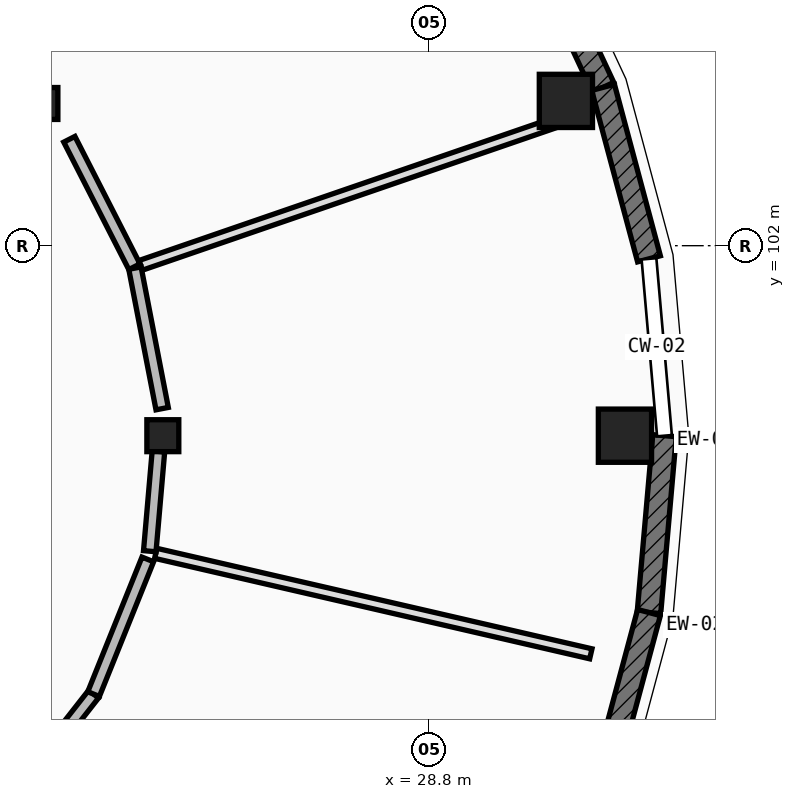
"""IFC4 building model, lengths in metres.
Left out: names, types, materials, properties, quantities, classifications, styles, units other than length and angle.
Written with IfcOpenShell. Run it as: python <this file> out.ifc"""

import sys

from ifc_helpers import new_model, si_unit, direction, frame, frame_2d, origin, origin_2d, place, context, subcontext, project, spatial, rectangle, circle, extrude, element, fill, save


model = new_model("IFC4")
c1 = context("Model", 3, precision=1e-05, world=origin(), true_north=direction((0.0, 1.0)))
c2 = subcontext(c1, "Body", "Model", "MODEL_VIEW")
j1 = project(units=[si_unit("LENGTHUNIT", "METRE"), si_unit("PLANEANGLEUNIT", "RADIAN")], contexts=[c1])
p1 = place(None, origin())
s1 = spatial("IfcSite", under=j1, at=p1, CompositionType="ELEMENT")
p2 = place(p1, origin())
s2 = spatial("IfcBuilding", under=s1, at=p2, CompositionType="ELEMENT")
p3 = place(p2, origin())
s3 = spatial("IfcBuildingStorey", under=s2, at=p3, CompositionType="ELEMENT", Elevation=0.0)
for number, where, z_axis, x_axis in (
    (1, (31.38, 99.5, 0.0), (0.0, 0.0, 1.0), (1.0, 0.0, 0.0)),
    (2, (30.603, 103.905, 0.0), (0.0, 0.0, 1.0), (1.0, 0.0, 0.0)),
):
    element("IfcColumn", number, at=place(p3, frame(where, z_axis=z_axis, x_axis=x_axis)), inside=s3, PredefinedType="COLUMN", context=c2, shape_type="SweptSolid", body=[
        extrude(circle(Radius=0.35, at=origin_2d()), origin(), (0.0, 0.0, 1.0), 4.55),
    ])
for number, where, z_axis, x_axis in (
    (3, (25.3, 99.5, 0.0), (0.0, 0.0, 1.0), (1.0, 0.0, 0.0)),
    (4, (23.709, 103.871, 0.0), (0.0, 0.0, 1.0), (1.0, 0.0, 0.0)),
):
    element("IfcColumn", number, at=place(p3, frame(where, z_axis=z_axis, x_axis=x_axis)), inside=s3, PredefinedType="COLUMN", context=c2, shape_type="SweptSolid", body=[
        extrude(rectangle(XDim=0.42, YDim=0.42, at=origin_2d()), origin(), (0.0, 0.0, 1.0), 4.55),
    ])
p4 = place(p3, frame((31.9, 99.5, 0.0), z_axis=(0.0, 0.0, 1.0), x_axis=(-0.087274565792, -0.996184295282, 0.0)))
e5 = element("IfcWall", 5, at=p4, inside=s3, PredefinedType="SOLIDWALL", context=c2, shape_type="SweptSolid", body=[
    extrude(rectangle(XDim=2.336, YDim=0.31, at=frame_2d((1.168, 0.0))), origin(), (0.0, 0.0, 1.0), 3.659),
])
p5 = place(p3, frame((31.696, 97.173, 0.0), z_axis=(0.0, 0.0, 1.0), x_axis=(-0.258612423585, -0.965981166673, 0.0)))
e6 = element("IfcWall", 6, at=p5, inside=s3, PredefinedType="SOLIDWALL", context=c2, shape_type="SweptSolid", body=[
    extrude(rectangle(XDim=2.335, YDim=0.31, at=frame_2d((1.168, 0.0))), origin(), (0.0, 0.0, 1.0), 3.659),
])
p6 = place(p3, frame((30.105, 106.2, 0.0), z_axis=(0.0, 0.0, 1.0), x_axis=(0.422587894318, -0.906321946979, 0.0)))
e7 = element("IfcWall", 7, at=p6, inside=s3, PredefinedType="SOLIDWALL", context=c2, shape_type="SweptSolid", body=[
    extrude(rectangle(XDim=2.336, YDim=0.31, at=frame_2d((1.168, 0.0))), origin(), (0.0, 0.0, 1.0), 3.659),
])
p7 = place(p3, frame((31.092, 104.083, 0.0), z_axis=(0.0, 0.0, 1.0), x_axis=(0.258612423585, -0.965981166673, 0.0)))
e8 = element("IfcWall", 8, at=p7, inside=s3, PredefinedType="SOLIDWALL", context=c2, shape_type="SweptSolid", body=[
    extrude(rectangle(XDim=2.335, YDim=0.31, at=frame_2d((1.168, 0.0))), origin(), (0.0, 0.0, 1.0), 3.659),
])
p8 = place(p3, frame((25.207, 97.952, 0.0), z_axis=(0.0, 0.0, 1.0), x_axis=(0.97434915279, -0.225041614944, 0.0)))
e9 = element("IfcWall", 9, at=p8, inside=s3, PredefinedType="PLUMBINGWALL", context=c2, shape_type="SweptSolid", body=[
    extrude(rectangle(XDim=5.875, YDim=0.135, at=frame_2d((2.937, 0.0))), origin(), (0.0, 0.0, 1.0), 3.634),
])
p9 = place(p3, frame((25.008, 101.741, 0.0), z_axis=(0.0, 0.0, 1.0), x_axis=(0.945537377012, 0.325513546068, 0.0)))
e10 = element("IfcWall", 10, at=p9, inside=s3, PredefinedType="PLUMBINGWALL", context=c2, shape_type="SweptSolid", body=[
    extrude(rectangle(XDim=5.898, YDim=0.135, at=frame_2d((2.949, 0.0))), origin(), (0.0, 0.0, 1.0), 3.634),
])
p10 = place(p3, frame((23.786, 95.33, 0.0), z_axis=(0.0, 0.0, 1.0), x_axis=(0.616563995623, 0.787304794411, 0.0)))
e11 = element("IfcWall", 11, at=p10, inside=s3, PredefinedType="PARTITIONING", context=c2, shape_type="SweptSolid", body=[
    extrude(rectangle(XDim=0.978, YDim=0.165, at=frame_2d((0.489, 0.0))), origin(), (0.0, 0.0, 1.0), 3.634),
])
p11 = place(p3, frame((24.389, 96.1, 0.0), z_axis=(0.0, 0.0, 1.0), x_axis=(0.373351165524, 0.927690092219, 0.0)))
e12 = element("IfcWall", 12, at=p11, inside=s3, PredefinedType="PARTITIONING", context=c2, shape_type="SweptSolid", body=[
    extrude(rectangle(XDim=1.91, YDim=0.165, at=frame_2d((0.955, 0.0))), origin(), (0.0, 0.0, 1.0), 3.634),
])
p12 = place(p11, frame((0.48, 0.0, 0.0)))
e13 = element("IfcOpeningElement", 13, at=p12, cuts=e12, PredefinedType="OPENING", context=c2, shape_type="SweptSolid", body=[
    extrude(rectangle(XDim=0.95, YDim=2.16, at=frame_2d((0.475, 1.08))), frame((0.0, 0.093, 0.0), z_axis=(0.0, -1.0, 0.0), x_axis=(1.0, 0.0, 0.0)), (0.0, 0.0, 1.0), 0.185),
])
p13 = place(p3, frame((25.128, 97.98, 0.0), z_axis=(0.0, 0.0, 1.0), x_axis=(0.086509710028, 0.996251007563, 0.0)))
e14 = element("IfcWall", 14, at=p13, inside=s3, PredefinedType="PARTITIONING", context=c2, shape_type="SweptSolid", body=[
    extrude(rectangle(XDim=1.318, YDim=0.165, at=frame_2d((0.659, 0.0))), origin(), (0.0, 0.0, 1.0), 3.634),
])
p14 = place(p3, frame((25.291, 99.856, 0.0), z_axis=(0.0, 0.0, 1.0), x_axis=(-0.19002996748, 0.981778290379, 0.0)))
e15 = element("IfcWall", 15, at=p14, inside=s3, PredefinedType="PARTITIONING", context=c2, shape_type="SweptSolid", body=[
    extrude(rectangle(XDim=1.884, YDim=0.165, at=frame_2d((0.942, 0.0))), origin(), (0.0, 0.0, 1.0), 3.634),
])
p15 = place(p14, frame((0.452, 0.0, 0.0)))
e16 = element("IfcOpeningElement", 16, at=p15, cuts=e15, PredefinedType="OPENING", context=c2, shape_type="SweptSolid", body=[
    extrude(rectangle(XDim=0.98, YDim=2.1, at=frame_2d((0.49, 1.05))), frame((0.0, 0.093, 0.0), z_axis=(0.0, -1.0, 0.0), x_axis=(1.0, 0.0, 0.0)), (0.0, 0.0, 1.0), 0.185),
])
p16 = place(p3, frame((24.926, 101.723, 0.0), z_axis=(0.0, 0.0, 1.0), x_axis=(-0.454615215632, 0.890687939582, 0.0)))
e17 = element("IfcWall", 17, at=p16, inside=s3, PredefinedType="PARTITIONING", context=c2, shape_type="SweptSolid", body=[
    extrude(rectangle(XDim=1.883, YDim=0.165, at=frame_2d((0.941, 0.0))), origin(), (0.0, 0.0, 1.0), 3.634),
])
p17 = place(p16, frame((0.492, 0.0, 0.0)))
e18 = element("IfcOpeningElement", 18, at=p17, cuts=e17, PredefinedType="OPENING", context=c2, shape_type="SweptSolid", body=[
    extrude(rectangle(XDim=0.9, YDim=2.1, at=frame_2d((0.45, 1.05))), frame((0.0, 0.093, 0.0), z_axis=(0.0, -1.0, 0.0), x_axis=(1.0, 0.0, 0.0)), (0.0, 0.0, 1.0), 0.185),
])
p18 = place(p12, origin())
e19 = element("IfcDoor", 19, at=p18, inside=s3, OperationType="SINGLE_SWING_RIGHT", PredefinedType="DOOR", context=c2, shape_type="SweptSolid", body=[
    extrude(rectangle(XDim=0.95, YDim=2.16, at=frame_2d((0.475, 1.08))), frame((0.0, 0.025, 0.0), z_axis=(0.0, -1.0, 0.0), x_axis=(1.0, 0.0, 0.0)), (0.0, 0.0, 1.0), 0.05),
])
fill(e13, e19)
p19 = place(p15, origin())
e20 = element("IfcDoor", 20, at=p19, inside=s3, OperationType="SINGLE_SWING_LEFT", PredefinedType="DOOR", context=c2, shape_type="SweptSolid", body=[
    extrude(rectangle(XDim=0.98, YDim=2.1, at=frame_2d((0.49, 1.05))), frame((0.0, 0.025, 0.0), z_axis=(0.0, -1.0, 0.0), x_axis=(1.0, 0.0, 0.0)), (0.0, 0.0, 1.0), 0.05),
])
fill(e16, e20)
p20 = place(p17, origin())
e21 = element("IfcDoor", 21, at=p20, inside=s3, OperationType="SINGLE_SWING_RIGHT", PredefinedType="DOOR", context=c2, shape_type="SweptSolid", body=[
    extrude(rectangle(XDim=0.9, YDim=2.1, at=frame_2d((0.45, 1.05))), frame((0.0, 0.025, 0.0), z_axis=(0.0, -1.0, 0.0), x_axis=(1.0, 0.0, 0.0)), (0.0, 0.0, 1.0), 0.05),
])
fill(e18, e21)
save(model, sys.argv[1])
